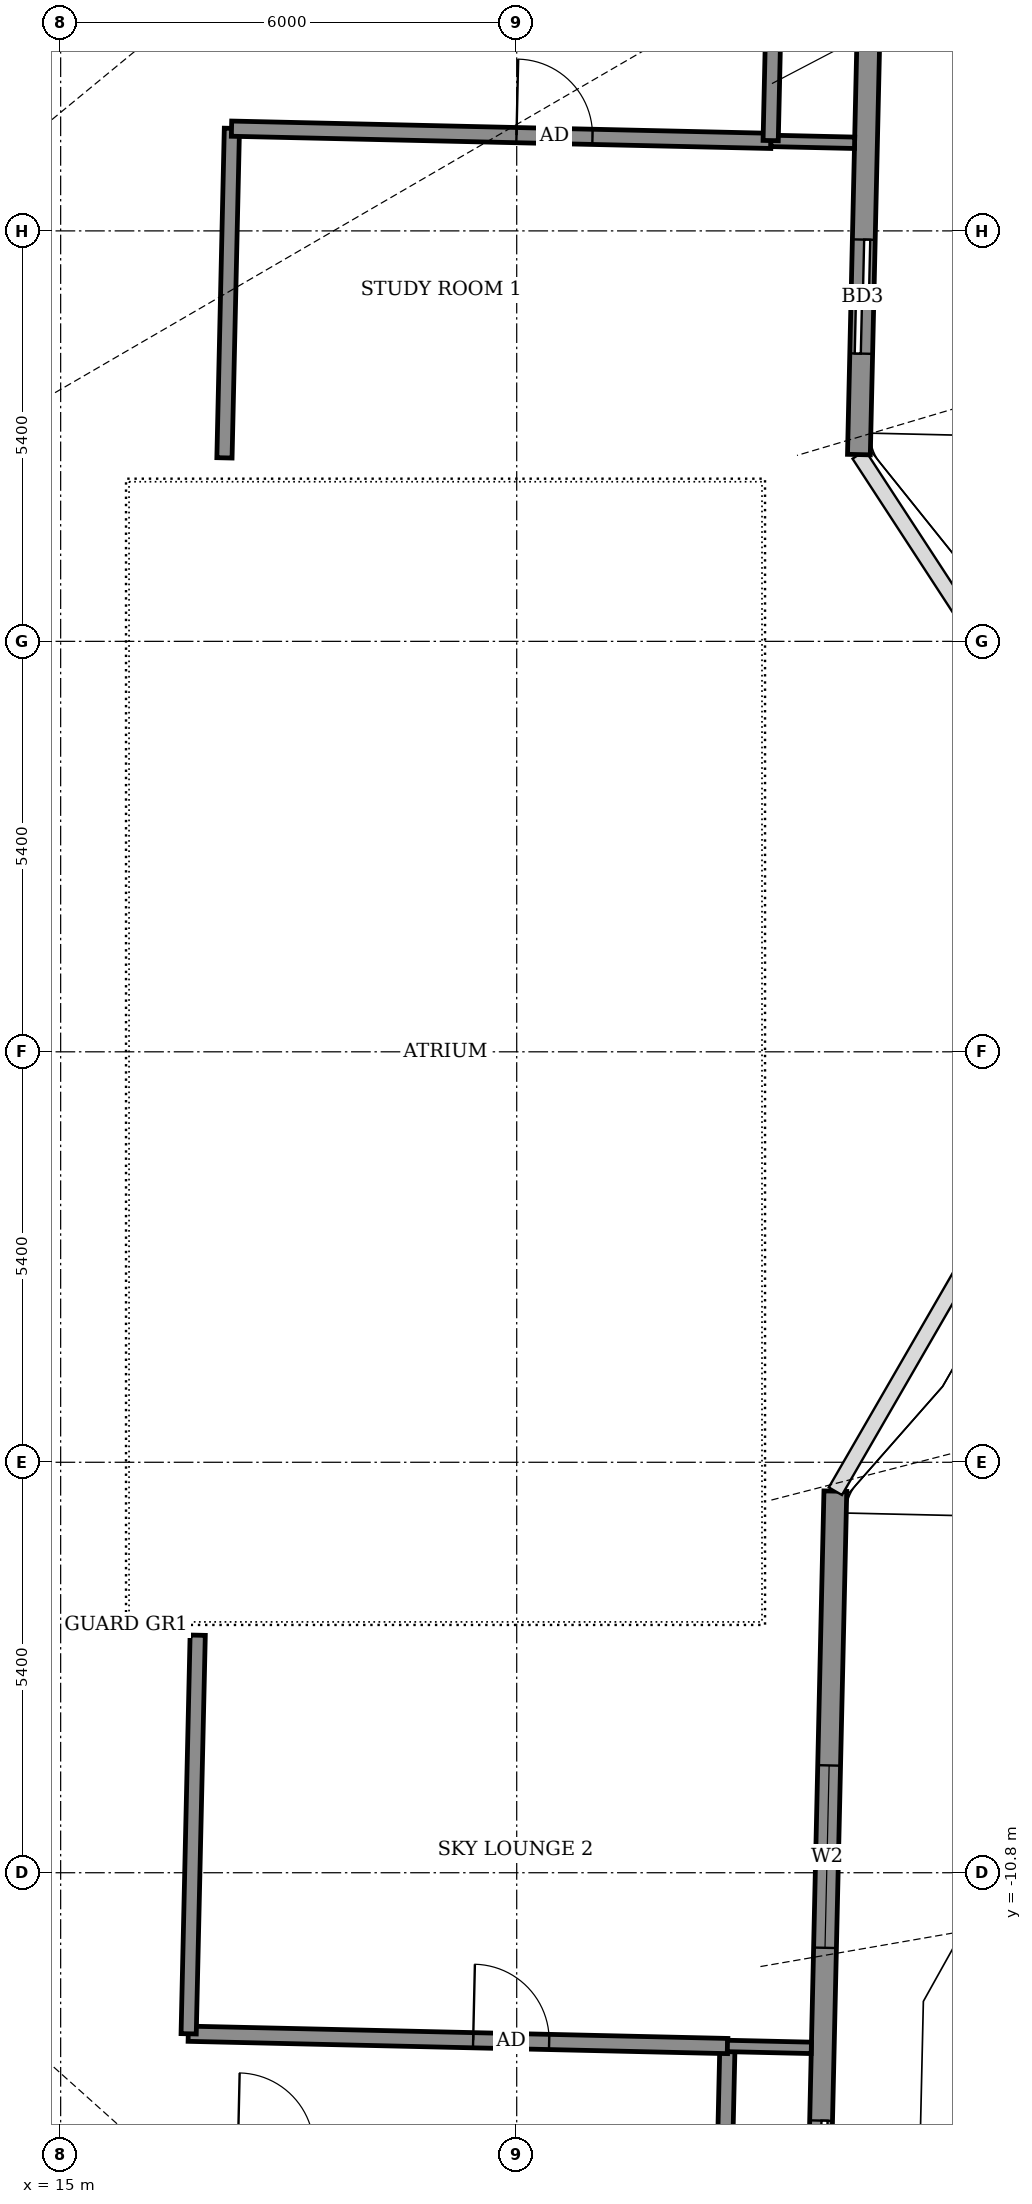
"""IFC4 building model, lengths in metres.
Left out: names, types, materials, properties, quantities, classifications, styles, units other than length and angle.
Written with IfcOpenShell. Run it as: python <this file> out.ifc"""

import sys

from ifc_helpers import new_model, si_unit, direction, frame, frame_2d, origin, place, context, subcontext, project, spatial, rectangle, extrude, element, fill, save


model = new_model("IFC4")
c1 = context("Model", 3, precision=1e-05, world=origin(), true_north=direction((0.0, 1.0)))
c2 = subcontext(c1, "Body", "Model", "MODEL_VIEW")
j1 = project(units=[si_unit("LENGTHUNIT", "METRE"), si_unit("PLANEANGLEUNIT", "RADIAN")], contexts=[c1])
p1 = place(None, origin())
s1 = spatial("IfcSite", under=j1, at=p1, CompositionType="ELEMENT")
p2 = place(p1, origin())
s2 = spatial("IfcBuilding", under=s1, at=p2, CompositionType="ELEMENT")
p3 = place(p2, frame((0.0, 0.0, 97.3)))
s3 = spatial("IfcBuildingStorey", under=s2, at=p3, CompositionType="ELEMENT", Elevation=97.3)
p4 = place(p3, frame((24.911, -18.197, 0.0), z_axis=(0.0, 0.0, 1.0), x_axis=(0.022624958127, 0.999744022873, 0.0)))
e1 = element("IfcWall", 1, at=p4, inside=s3, PredefinedType="SOLIDWALL", context=c2, shape_type="SweptSolid", body=[
    extrude(rectangle(XDim=12.42, YDim=0.3, at=frame_2d((6.21, 0.0))), origin(), (0.0, 0.0, 1.0), 2.85),
])
p5 = place(p4, frame((2.637, 0.0, 0.0)))
e2 = element("IfcOpeningElement", 2, at=p5, cuts=e1, PredefinedType="OPENING", context=c2, shape_type="SweptSolid", body=[
    extrude(rectangle(XDim=1.5, YDim=2.4, at=frame_2d((0.75, 1.2))), frame((0.0, 0.16, 0.0), z_axis=(0.0, -1.0, 0.0), x_axis=(1.0, 0.0, 0.0)), (0.0, 0.0, 1.0), 0.32),
])
p6 = place(p4, frame((6.411, 0.0, 0.9)))
e3 = element("IfcOpeningElement", 3, at=p6, cuts=e1, PredefinedType="OPENING", context=c2, shape_type="SweptSolid", body=[
    extrude(rectangle(XDim=2.4, YDim=1.5, at=frame_2d((1.2, 0.75))), frame((0.0, 0.16, 0.0), z_axis=(0.0, -1.0, 0.0), x_axis=(1.0, 0.0, 0.0)), (0.0, 0.0, 1.0), 0.32),
])
p7 = place(p3, frame((25.502, 7.857, 0.0), z_axis=(0.0, 0.0, 1.0), x_axis=(0.022680323815, 0.999742768372, 0.0)))
e4 = element("IfcWall", 4, at=p7, inside=s3, PredefinedType="SOLIDWALL", context=c2, shape_type="SweptSolid", body=[
    extrude(rectangle(XDim=13.229, YDim=0.3, at=frame_2d((6.615, 0.0))), origin(), (0.0, 0.0, 1.0), 2.35),
])
p8 = place(p7, frame((1.329, 0.0, 0.0)))
e5 = element("IfcOpeningElement", 5, at=p8, cuts=e4, PredefinedType="OPENING", context=c2, shape_type="SweptSolid", body=[
    extrude(rectangle(XDim=1.5, YDim=2.0, at=frame_2d((0.75, 1.0))), frame((0.0, 0.16, 0.0), z_axis=(0.0, -1.0, 0.0), x_axis=(1.0, 0.0, 0.0)), (0.0, 0.0, 1.0), 0.32),
])
p9 = place(p7, frame((8.141, 0.0, 0.5)))
e6 = element("IfcOpeningElement", 6, at=p9, cuts=e4, PredefinedType="OPENING", context=c2, shape_type="SweptSolid", body=[
    extrude(rectangle(XDim=1.2, YDim=1.1, at=frame_2d((0.6, 0.55))), frame((0.0, 0.16, 0.0), z_axis=(0.0, -1.0, 0.0), x_axis=(1.0, 0.0, 0.0)), (0.0, 0.0, 1.0), 0.32),
])
p10 = place(p3, frame((-24.332, -13.488, 0.0), z_axis=(0.0, 0.0, 1.0), x_axis=(0.999742555853, -0.022689689667, 0.0)))
e7 = element("IfcWall", 7, at=p10, inside=s3, PredefinedType="PARTITIONING", context=c2, shape_type="SweptSolid", body=[
    extrude(rectangle(XDim=48.086, YDim=0.2, at=frame_2d((24.043, 0.0))), origin(), (0.0, 0.0, 1.0), 2.45),
])
p11 = place(p10, frame((0.2, 0.0, 0.0)))
e8 = element("IfcOpeningElement", 8, at=p11, cuts=e7, PredefinedType="OPENING", context=c2, shape_type="SweptSolid", body=[
    extrude(rectangle(XDim=1.0, YDim=2.1, at=frame_2d((0.5, 1.05))), frame((0.0, 0.11, 0.0), z_axis=(0.0, -1.0, 0.0), x_axis=(1.0, 0.0, 0.0)), (0.0, 0.0, 1.0), 0.22),
])
p12 = place(p10, frame((3.879, 0.0, 0.0)))
e9 = element("IfcOpeningElement", 9, at=p12, cuts=e7, PredefinedType="OPENING", context=c2, shape_type="SweptSolid", body=[
    extrude(rectangle(XDim=0.9, YDim=2.1, at=frame_2d((0.45, 1.05))), frame((0.0, 0.11, 0.0), z_axis=(0.0, -1.0, 0.0), x_axis=(1.0, 0.0, 0.0)), (0.0, 0.0, 1.0), 0.22),
])
p13 = place(p10, frame((8.929, 0.0, 0.0)))
e10 = element("IfcOpeningElement", 10, at=p13, cuts=e7, PredefinedType="OPENING", context=c2, shape_type="SweptSolid", body=[
    extrude(rectangle(XDim=1.0, YDim=2.1, at=frame_2d((0.5, 1.05))), frame((0.0, 0.11, 0.0), z_axis=(0.0, -1.0, 0.0), x_axis=(1.0, 0.0, 0.0)), (0.0, 0.0, 1.0), 0.22),
])
p14 = place(p10, frame((17.004, 0.0, 0.0)))
e11 = element("IfcOpeningElement", 11, at=p14, cuts=e7, PredefinedType="OPENING", context=c2, shape_type="SweptSolid", body=[
    extrude(rectangle(XDim=1.0, YDim=2.1, at=frame_2d((0.5, 1.05))), frame((0.0, 0.11, 0.0), z_axis=(0.0, -1.0, 0.0), x_axis=(1.0, 0.0, 0.0)), (0.0, 0.0, 1.0), 0.22),
])
p15 = place(p10, frame((25.054, 0.0, 0.0)))
e12 = element("IfcOpeningElement", 12, at=p15, cuts=e7, PredefinedType="OPENING", context=c2, shape_type="SweptSolid", body=[
    extrude(rectangle(XDim=0.9, YDim=2.1, at=frame_2d((0.45, 1.05))), frame((0.0, 0.11, 0.0), z_axis=(0.0, -1.0, 0.0), x_axis=(1.0, 0.0, 0.0)), (0.0, 0.0, 1.0), 0.22),
])
p16 = place(p10, frame((27.679, 0.0, 0.0)))
e13 = element("IfcOpeningElement", 13, at=p16, cuts=e7, PredefinedType="OPENING", context=c2, shape_type="SweptSolid", body=[
    extrude(rectangle(XDim=0.9, YDim=2.1, at=frame_2d((0.45, 1.05))), frame((0.0, 0.11, 0.0), z_axis=(0.0, -1.0, 0.0), x_axis=(1.0, 0.0, 0.0)), (0.0, 0.0, 1.0), 0.22),
])
p17 = place(p10, frame((35.079, 0.0, 0.0)))
e14 = element("IfcOpeningElement", 14, at=p17, cuts=e7, PredefinedType="OPENING", context=c2, shape_type="SweptSolid", body=[
    extrude(rectangle(XDim=0.9, YDim=2.1, at=frame_2d((0.45, 1.05))), frame((0.0, 0.11, 0.0), z_axis=(0.0, -1.0, 0.0), x_axis=(1.0, 0.0, 0.0)), (0.0, 0.0, 1.0), 0.22),
])
p18 = place(p10, frame((41.675, 0.0, 0.0)))
e15 = element("IfcOpeningElement", 15, at=p18, cuts=e7, PredefinedType="OPENING", context=c2, shape_type="SweptSolid", body=[
    extrude(rectangle(XDim=1.0, YDim=2.1, at=frame_2d((0.5, 1.05))), frame((0.0, 0.11, 0.0), z_axis=(0.0, -1.0, 0.0), x_axis=(1.0, 0.0, 0.0)), (0.0, 0.0, 1.0), 0.22),
])
p19 = place(p3, frame((23.738, -14.579, 0.0), z_axis=(0.0, 0.0, 1.0), x_axis=(0.022617910375, 0.999744182344, 0.0)))
e16 = element("IfcWall", 16, at=p19, inside=s3, PredefinedType="PARTITIONING", context=c2, shape_type="SweptSolid", body=[
    extrude(rectangle(XDim=1.5, YDim=0.2, at=frame_2d((0.75, 0.0))), origin(), (0.0, 0.0, 1.0), 4.05),
])
p20 = place(p3, frame((16.679, -12.918, 0.0), z_axis=(0.0, 0.0, 1.0), x_axis=(0.999739218926, -0.02283624622, 0.0)))
e17 = element("IfcWall", 17, at=p20, inside=s3, PredefinedType="PARTITIONING", context=c2, shape_type="SweptSolid", body=[
    extrude(rectangle(XDim=7.099, YDim=0.2, at=frame_2d((3.549, 0.0))), origin(), (0.0, 0.0, 1.0), 4.05),
])
p21 = place(p20, frame((3.749, 0.0, 0.0)))
e18 = element("IfcOpeningElement", 18, at=p21, cuts=e17, PredefinedType="OPENING", context=c2, shape_type="SweptSolid", body=[
    extrude(rectangle(XDim=1.0, YDim=2.1, at=frame_2d((0.5, 1.05))), frame((0.0, 0.11, 0.0), z_axis=(0.0, -1.0, 0.0), x_axis=(1.0, 0.0, 0.0)), (0.0, 0.0, 1.0), 0.22),
])
p22 = place(p3, frame((16.684, -12.919, 0.0), z_axis=(0.0, 0.0, 1.0), x_axis=(0.022667483124, 0.999743059595, 0.0)))
e19 = element("IfcWall", 19, at=p22, inside=s3, PredefinedType="PARTITIONING", context=c2, shape_type="SweptSolid", body=[
    extrude(rectangle(XDim=5.245, YDim=0.2, at=frame_2d((2.623, 0.0))), origin(), (0.0, 0.0, 1.0), 4.05),
])
p23 = place(p3, frame((23.772, -13.079, 0.0), z_axis=(0.0, 0.0, 1.0), x_axis=(0.999745701647, -0.022550654924, 0.0)))
e20 = element("IfcWall", 20, at=p23, inside=s3, PredefinedType="PARTITIONING", context=c2, shape_type="SweptSolid", body=[
    extrude(rectangle(XDim=1.104, YDim=0.15, at=frame_2d((0.552, 0.0))), origin(), (0.0, 0.0, 1.0), 4.05),
])
p24 = place(p3, frame((17.155, 7.814, 0.0), z_axis=(0.0, 0.0, 1.0), x_axis=(0.022578158225, 0.999745080894, 0.0)))
e21 = element("IfcWall", 21, at=p24, inside=s3, PredefinedType="PARTITIONING", context=c2, shape_type="SweptSolid", body=[
    extrude(rectangle(XDim=4.336, YDim=0.2, at=frame_2d((2.168, 0.0))), origin(), (0.0, 0.0, 1.0), 2.35),
])
p25 = place(p3, frame((17.248, 12.145, 0.0), z_axis=(0.0, 0.0, 1.0), x_axis=(0.999742350192, -0.022698749566, 0.0)))
e22 = element("IfcWall", 22, at=p25, inside=s3, PredefinedType="PARTITIONING", context=c2, shape_type="SweptSolid", body=[
    extrude(rectangle(XDim=7.099, YDim=0.2, at=frame_2d((3.549, 0.0))), origin(), (0.0, 0.0, 1.0), 2.35),
])
p26 = place(p25, frame((3.75, 0.0, 0.0)))
e23 = element("IfcOpeningElement", 23, at=p26, cuts=e22, PredefinedType="OPENING", context=c2, shape_type="SweptSolid", body=[
    extrude(rectangle(XDim=1.0, YDim=2.1, at=frame_2d((0.5, 1.05))), frame((0.0, 0.11, 0.0), z_axis=(0.0, -1.0, 0.0), x_axis=(1.0, 0.0, 0.0)), (0.0, 0.0, 1.0), 0.22),
])
p27 = place(p3, frame((24.345, 11.984, 0.0), z_axis=(0.0, 0.0, 1.0), x_axis=(0.9997438932, -0.022630687329, 0.0)))
e24 = element("IfcWall", 24, at=p27, inside=s3, PredefinedType="PARTITIONING", context=c2, shape_type="SweptSolid", body=[
    extrude(rectangle(XDim=1.1, YDim=0.15, at=frame_2d((0.55, 0.0))), origin(), (0.0, 0.0, 1.0), 4.05),
])
p28 = place(p3, frame((24.341, 11.988, 0.0), z_axis=(0.0, 0.0, 1.0), x_axis=(0.022617910375, 0.999744182344, 0.0)))
e25 = element("IfcWall", 25, at=p28, inside=s3, PredefinedType="PARTITIONING", context=c2, shape_type="SweptSolid", body=[
    extrude(rectangle(XDim=1.5, YDim=0.2, at=frame_2d((0.75, 0.0))), origin(), (0.0, 0.0, 1.0), 2.35),
])
p29 = place(p5, origin())
e26 = element("IfcDoor", 26, at=p29, inside=s3, OperationType="SLIDING_TO_LEFT", PredefinedType="DOOR", context=c2, shape_type="SweptSolid", body=[
    extrude(rectangle(XDim=1.5, YDim=2.4, at=frame_2d((0.75, 1.2))), frame((0.0, 0.025, 0.0), z_axis=(0.0, -1.0, 0.0), x_axis=(1.0, 0.0, 0.0)), (0.0, 0.0, 1.0), 0.05),
])
fill(e2, e26)
p30 = place(p6, origin())
e27 = element("IfcWindow", 27, at=p30, inside=s3, PartitioningType="DOUBLE_PANEL_VERTICAL", PredefinedType="WINDOW", context=c2, shape_type="SweptSolid", body=[
    extrude(rectangle(XDim=2.4, YDim=1.5, at=frame_2d((1.2, 0.75))), frame((0.0, 0.03, 0.0), z_axis=(0.0, -1.0, 0.0), x_axis=(1.0, 0.0, 0.0)), (0.0, 0.0, 1.0), 0.06),
])
fill(e3, e27)
p31 = place(p8, origin())
e28 = element("IfcDoor", 28, at=p31, inside=s3, OperationType="SLIDING_TO_LEFT", PredefinedType="DOOR", context=c2, shape_type="SweptSolid", body=[
    extrude(rectangle(XDim=1.5, YDim=2.0, at=frame_2d((0.75, 1.0))), frame((0.0, 0.025, 0.0), z_axis=(0.0, -1.0, 0.0), x_axis=(1.0, 0.0, 0.0)), (0.0, 0.0, 1.0), 0.05),
])
fill(e5, e28)
p32 = place(p21, origin())
e29 = element("IfcDoor", 29, at=p32, inside=s3, OperationType="SINGLE_SWING_LEFT", PredefinedType="DOOR", context=c2, shape_type="SweptSolid", body=[
    extrude(rectangle(XDim=1.0, YDim=2.1, at=frame_2d((0.5, 1.05))), frame((0.0, 0.025, 0.0), z_axis=(0.0, -1.0, 0.0), x_axis=(1.0, 0.0, 0.0)), (0.0, 0.0, 1.0), 0.05),
])
fill(e18, e29)
p33 = place(p26, origin())
e30 = element("IfcDoor", 30, at=p33, inside=s3, OperationType="SINGLE_SWING_RIGHT", PredefinedType="DOOR", context=c2, shape_type="SweptSolid", body=[
    extrude(rectangle(XDim=1.0, YDim=2.1, at=frame_2d((0.5, 1.05))), frame((0.0, 0.025, 0.0), z_axis=(0.0, -1.0, 0.0), x_axis=(1.0, 0.0, 0.0)), (0.0, 0.0, 1.0), 0.05),
])
fill(e23, e30)
save(model, sys.argv[1])
